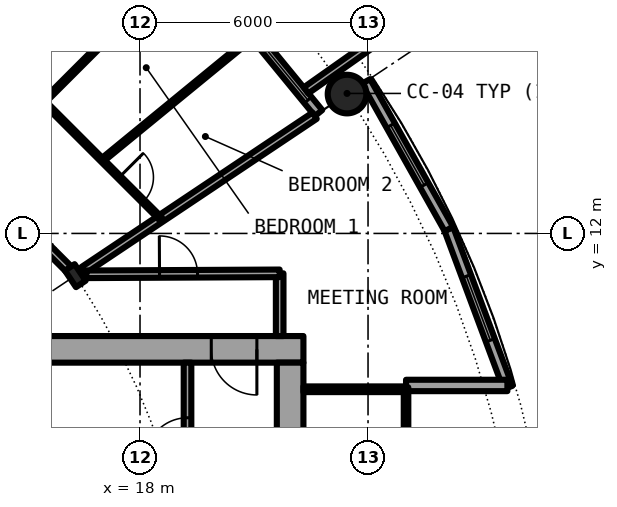
"""IFC4 building model, lengths in metres.
Left out: names, types, materials, properties, quantities, classifications, styles, units other than length and angle.
Written with IfcOpenShell. Run it as: python <this file> out.ifc"""

import sys

from ifc_helpers import new_model, si_unit, direction, frame, frame_2d, origin, origin_2d, place, context, subcontext, project, spatial, rectangle, hollow_circle, i_section, extrude, element, fill, save


model = new_model("IFC4")
c1 = context("Model", 3, precision=1e-05, world=origin(), true_north=direction((0.0, 1.0)))
c2 = subcontext(c1, "Body", "Model", "MODEL_VIEW")
j1 = project(units=[si_unit("LENGTHUNIT", "METRE"), si_unit("PLANEANGLEUNIT", "RADIAN")], contexts=[c1])
p1 = place(None, origin())
s1 = spatial("IfcSite", under=j1, at=p1, CompositionType="ELEMENT")
p2 = place(p1, origin())
s2 = spatial("IfcBuilding", under=s1, at=p2, CompositionType="ELEMENT")
p3 = place(p2, frame((0.0, 0.0, 75.8)))
s3 = spatial("IfcBuildingStorey", under=s2, at=p3, CompositionType="ELEMENT", Elevation=75.8)
p4 = place(p3, frame((23.448, 15.667, 0.0), z_axis=(0.0, 0.0, 1.0), x_axis=(1.0, 0.0, 0.0)))
e1 = element("IfcColumn", 1, at=p4, inside=s3, PredefinedType="COLUMN", context=c2, shape_type="SweptSolid", body=[
    extrude(hollow_circle(Radius=0.508, WallThickness=0.04, at=origin_2d()), origin(), (0.0, 0.0, 1.0), 3.05),
])
p5 = place(p3, frame((16.297, 10.889, 0.0), z_axis=(0.0, 0.0, 1.0), x_axis=(0.831469612303, 0.55557023302, 0.0)))
e2 = element("IfcColumn", 2, at=p5, inside=s3, PredefinedType="COLUMN", context=c2, shape_type="SweptSolid", body=[
    extrude(i_section(OverallWidth=0.306, OverallDepth=0.524, WebThickness=0.021, FlangeThickness=0.04, FilletRadius=0.027, at=origin_2d()), origin(), (0.0, 0.0, 1.0), 3.05),
])
p6 = place(p3, frame((22.699, 15.167, 0.0), z_axis=(0.0, 0.0, 1.0), x_axis=(-0.634382322723, 0.773019449054, 0.0)))
e3 = element("IfcWall", 3, at=p6, inside=s3, PredefinedType="SOLIDWALL", context=c2, shape_type="SweptSolid", body=[
    extrude(rectangle(XDim=5.352, YDim=0.25, at=frame_2d((2.676, 0.0))), origin(), (0.0, 0.0, 1.0), 2.7),
])
p7 = place(p6, frame((0.441, 0.0, 0.3)))
e4 = element("IfcOpeningElement", 4, at=p7, cuts=e3, PredefinedType="OPENING", context=c2, shape_type="SweptSolid", body=[
    extrude(rectangle(XDim=1.8, YDim=2.1, at=frame_2d((0.9, 1.05))), frame((0.0, 0.135, 0.0), z_axis=(0.0, -1.0, 0.0), x_axis=(1.0, 0.0, 0.0)), (0.0, 0.0, 1.0), 0.27),
])
p8 = place(p6, frame((3.51, 0.0, 0.0)))
e5 = element("IfcOpeningElement", 5, at=p8, cuts=e3, PredefinedType="OPENING", context=c2, shape_type="SweptSolid", body=[
    extrude(rectangle(XDim=1.0, YDim=2.2, at=frame_2d((0.5, 1.1))), frame((0.0, 0.135, 0.0), z_axis=(0.0, -1.0, 0.0), x_axis=(1.0, 0.0, 0.0)), (0.0, 0.0, 1.0), 0.27),
])
p9 = place(p3, frame((22.37, 15.765, -0.03), z_axis=(0.0, 0.0, 1.0), x_axis=(0.817256123454, 0.576274612209, 0.0)))
e6 = element("IfcWall", 6, at=p9, inside=s3, PredefinedType="SOLIDWALL", context=c2, shape_type="SweptSolid", body=[
    extrude(rectangle(XDim=2.933, YDim=0.2, at=frame_2d((1.466, 0.0))), origin(), (0.0, 0.0, 1.0), 2.73),
])
p10 = place(p3, frame((27.682, 7.945, 0.0), z_axis=(0.0, 0.0, 1.0), x_axis=(-0.349247811493, 0.937030397675, 0.0)))
e7 = element("IfcWall", 7, at=p10, inside=s3, PredefinedType="SOLIDWALL", context=c2, shape_type="SweptSolid", body=[
    extrude(rectangle(XDim=4.452, YDim=0.25, at=frame_2d((2.226, 0.0))), origin(), (0.0, 0.0, 1.0), 2.7),
])
p11 = place(p10, frame((1.327, 0.0, 0.3)))
e8 = element("IfcOpeningElement", 8, at=p11, cuts=e7, PredefinedType="OPENING", context=c2, shape_type="SweptSolid", body=[
    extrude(rectangle(XDim=1.8, YDim=2.1, at=frame_2d((0.9, 1.05))), frame((0.0, 0.135, 0.0), z_axis=(0.0, -1.0, 0.0), x_axis=(1.0, 0.0, 0.0)), (0.0, 0.0, 1.0), 0.27),
])
p12 = place(p3, frame((26.127, 12.117, 0.0), z_axis=(0.0, 0.0, 1.0), x_axis=(-0.489696356642, 0.871893042919, 0.0)))
e9 = element("IfcWall", 9, at=p12, inside=s3, PredefinedType="SOLIDWALL", context=c2, shape_type="SweptSolid", body=[
    extrude(rectangle(XDim=4.454, YDim=0.25, at=frame_2d((2.227, 0.0))), origin(), (0.0, 0.0, 1.0), 2.7),
])
p13 = place(p12, frame((1.327, 0.0, 0.3)))
e10 = element("IfcOpeningElement", 10, at=p13, cuts=e9, PredefinedType="OPENING", context=c2, shape_type="SweptSolid", body=[
    extrude(rectangle(XDim=1.8, YDim=2.1, at=frame_2d((0.9, 1.05))), frame((0.0, 0.135, 0.0), z_axis=(0.0, -1.0, 0.0), x_axis=(1.0, 0.0, 0.0)), (0.0, 0.0, 1.0), 0.27),
])
p14 = place(p3, frame((25.0, 8.0, 0.0), z_axis=(0.0, 0.0, 1.0), x_axis=(1.0, 0.0, 0.0)))
e11 = element("IfcWall", 11, at=p14, inside=s3, PredefinedType="SOLIDWALL", context=c2, shape_type="SweptSolid", body=[
    extrude(rectangle(XDim=2.667, YDim=0.3, at=frame_2d((1.333, 0.0))), origin(), (0.0, 0.0, 1.0), 2.7),
])
p15 = place(p3, frame((22.3, 8.95, 0.0), z_axis=(0.0, 0.0, 1.0), x_axis=(-1.0, 0.0, 0.0)))
e12 = element("IfcWall", 12, at=p15, inside=s3, PredefinedType="SHEAR", context=c2, shape_type="SweptSolid", body=[
    extrude(rectangle(XDim=14.0, YDim=0.7, at=frame_2d((7.0, 0.0))), origin(), (0.0, 0.0, 1.0), 3.05),
])
p16 = place(p15, frame((1.225, 0.0, 0.0)))
e13 = element("IfcOpeningElement", 13, at=p16, cuts=e12, PredefinedType="OPENING", context=c2, shape_type="SweptSolid", body=[
    extrude(rectangle(XDim=1.2, YDim=2.3, at=frame_2d((0.6, 1.15))), frame((0.0, 0.36, 0.0), z_axis=(0.0, -1.0, 0.0), x_axis=(1.0, 0.0, 0.0)), (0.0, 0.0, 1.0), 0.72),
])
p17 = place(p3, frame((21.95, 8.6, 0.0), z_axis=(0.0, 0.0, 1.0), x_axis=(0.0, -1.0, 0.0)))
e14 = element("IfcWall", 14, at=p17, inside=s3, PredefinedType="SHEAR", context=c2, shape_type="SweptSolid", body=[
    extrude(rectangle(XDim=17.2, YDim=0.7, at=frame_2d((8.6, 0.0))), origin(), (0.0, 0.0, 1.0), 3.05),
])
p18 = place(p17, frame((7.7, 0.0, 0.0)))
e15 = element("IfcOpeningElement", 15, at=p18, cuts=e14, PredefinedType="OPENING", context=c2, shape_type="SweptSolid", body=[
    extrude(rectangle(XDim=1.8, YDim=2.3, at=frame_2d((0.9, 1.15))), frame((0.0, 0.36, 0.0), z_axis=(0.0, -1.0, 0.0), x_axis=(1.0, 0.0, 0.0)), (0.0, 0.0, 1.0), 0.72),
])
p19 = place(p3, frame((19.25, 1.575, 0.0), z_axis=(0.0, 0.0, 1.0), x_axis=(0.0, 1.0, 0.0)))
e16 = element("IfcWall", 16, at=p19, inside=s3, PredefinedType="SOLIDWALL", context=c2, shape_type="SweptSolid", body=[
    extrude(rectangle(XDim=7.025, YDim=0.2, at=frame_2d((3.513, 0.0))), origin(), (0.0, 0.0, 1.0), 2.7),
])
p20 = place(p19, frame((4.475, 0.0, 0.0)))
e17 = element("IfcOpeningElement", 17, at=p20, cuts=e16, PredefinedType="OPENING", context=c2, shape_type="SweptSolid", body=[
    extrude(rectangle(XDim=1.1, YDim=2.3, at=frame_2d((0.55, 1.15))), frame((0.0, 0.11, 0.0), z_axis=(0.0, -1.0, 0.0), x_axis=(1.0, 0.0, 0.0)), (0.0, 0.0, 1.0), 0.22),
])
p21 = place(p3, frame((22.3, 7.9, 0.0), z_axis=(0.0, 0.0, 1.0), x_axis=(1.0, 0.0, 0.0)))
e18 = element("IfcWall", 18, at=p21, inside=s3, PredefinedType="PARTITIONING", context=c2, shape_type="SweptSolid", body=[
    extrude(rectangle(XDim=2.64, YDim=0.15, at=frame_2d((1.32, 0.0))), origin(), (0.0, 0.0, 1.0), 2.7),
])
p22 = place(p3, frame((25.0, -7.95, 0.0), z_axis=(0.0, 0.0, 1.0), x_axis=(0.0, 1.0, 0.0)))
e19 = element("IfcWall", 19, at=p22, inside=s3, PredefinedType="PARTITIONING", context=c2, shape_type="SweptSolid", body=[
    extrude(rectangle(XDim=15.9, YDim=0.12, at=frame_2d((7.95, 0.0))), origin(), (0.0, 0.0, 1.0), 2.7),
])
p23 = place(p22, frame((0.95, 0.0, 0.1)))
e20 = element("IfcOpeningElement", 20, at=p23, cuts=e19, PredefinedType="OPENING", context=c2, shape_type="SweptSolid", body=[
    extrude(rectangle(XDim=14.0, YDim=2.35, at=frame_2d((7.0, 1.175))), frame((0.0, 0.07, 0.0), z_axis=(0.0, -1.0, 0.0), x_axis=(1.0, 0.0, 0.0)), (0.0, 0.0, 1.0), 0.14),
])
p24 = place(p3, frame((21.675, 9.3, 0.0), z_axis=(0.0, 0.0, 1.0), x_axis=(0.0, 1.0, 0.0)))
e21 = element("IfcWall", 21, at=p24, inside=s3, PredefinedType="PARTITIONING", context=c2, shape_type="SweptSolid", body=[
    extrude(rectangle(XDim=1.65, YDim=0.2, at=frame_2d((0.825, 0.0))), origin(), (0.0, 0.0, 1.0), 2.7),
])
p25 = place(p3, frame((15.465, 15.465, 0.0), z_axis=(0.0, 0.0, 1.0), x_axis=(0.707106781187, 0.707106781187, 0.0)))
e22 = element("IfcWall", 22, at=p25, inside=s3, PredefinedType="PARTITIONING", context=c2, shape_type="SweptSolid", body=[
    extrude(rectangle(XDim=5.305, YDim=0.1, at=frame_2d((2.652, 0.0))), origin(), (0.0, 0.0, 1.0), 2.7),
])
p26 = place(p25, frame((2.202, 0.0, 0.0)))
e23 = element("IfcOpeningElement", 23, at=p26, cuts=e22, PredefinedType="OPENING", context=c2, shape_type="SweptSolid", body=[
    extrude(rectangle(XDim=0.9, YDim=2.3, at=frame_2d((0.45, 1.15))), frame((0.0, 0.06, 0.0), z_axis=(0.0, -1.0, 0.0), x_axis=(1.0, 0.0, 0.0)), (0.0, 0.0, 1.0), 0.12),
])
p27 = place(p3, frame((16.515, 11.034, 0.0), z_axis=(0.0, 0.0, 1.0), x_axis=(0.831382022135, 0.555701298605, 0.0)))
e24 = element("IfcWall", 24, at=p27, inside=s3, PredefinedType="PARTITIONING", context=c2, shape_type="SweptSolid", body=[
    extrude(rectangle(XDim=7.313, YDim=0.2, at=frame_2d((3.657, 0.0))), origin(), (0.0, 0.0, 1.0), 2.7),
])
p28 = place(p3, frame((17.004, 13.927, 0.0), z_axis=(0.0, 0.0, 1.0), x_axis=(0.773517471898, 0.633774976367, 0.0)))
e25 = element("IfcWall", 25, at=p28, inside=s3, PredefinedType="PARTITIONING", context=c2, shape_type="SweptSolid", body=[
    extrude(rectangle(XDim=5.196, YDim=0.1, at=frame_2d((2.598, 0.0))), origin(), (0.0, 0.0, 1.0), 2.7),
])
p29 = place(p3, frame((16.588, 10.925, 0.0), z_axis=(0.0, 0.0, 1.0), x_axis=(0.999988019025, 0.004895079807, 0.0)))
e26 = element("IfcWall", 26, at=p29, inside=s3, PredefinedType="PARTITIONING", context=c2, shape_type="SweptSolid", body=[
    extrude(rectangle(XDim=5.087, YDim=0.2, at=frame_2d((2.543, 0.0))), origin(), (0.0, 0.0, 1.0), 2.7),
])
p30 = place(p29, frame((1.925, 0.0, 0.0)))
e27 = element("IfcOpeningElement", 27, at=p30, cuts=e26, PredefinedType="OPENING", context=c2, shape_type="SweptSolid", body=[
    extrude(rectangle(XDim=1.0, YDim=2.3, at=frame_2d((0.5, 1.15))), frame((0.0, 0.11, 0.0), z_axis=(0.0, -1.0, 0.0), x_axis=(1.0, 0.0, 0.0)), (0.0, 0.0, 1.0), 0.22),
])
p31 = place(p3, frame((11.0, 16.186, 0.0), z_axis=(0.0, 0.0, 1.0), x_axis=(0.707106781187, -0.707106781187, 0.0)))
e28 = element("IfcWall", 28, at=p31, inside=s3, PredefinedType="PARTITIONING", context=c2, shape_type="SweptSolid", body=[
    extrude(rectangle(XDim=7.334, YDim=0.2, at=frame_2d((3.667, 0.0))), origin(), (0.0, 0.0, 1.0), 2.38),
])
p32 = place(p31, frame((4.123, 0.0, 0.0)))
e29 = element("IfcOpeningElement", 29, at=p32, cuts=e28, PredefinedType="OPENING", context=c2, shape_type="SweptSolid", body=[
    extrude(rectangle(XDim=1.0, YDim=2.3, at=frame_2d((0.5, 1.15))), frame((0.0, 0.11, 0.0), z_axis=(0.0, -1.0, 0.0), x_axis=(1.0, 0.0, 0.0)), (0.0, 0.0, 1.0), 0.22),
])
p33 = place(p3, frame((15.465, 15.465, 0.0), z_axis=(0.0, 0.0, 1.0), x_axis=(0.707190945535, -0.707022606819, 0.0)))
e30 = element("IfcWall", 30, at=p33, inside=s3, PredefinedType="PARTITIONING", context=c2, shape_type="SweptSolid", body=[
    extrude(rectangle(XDim=4.351, YDim=0.1, at=frame_2d((2.175, 0.0))), origin(), (0.0, 0.0, 1.0), 2.7),
])
p34 = place(p33, frame((2.812, 0.0, 0.0)))
e31 = element("IfcOpeningElement", 31, at=p34, cuts=e30, PredefinedType="OPENING", context=c2, shape_type="SweptSolid", body=[
    extrude(rectangle(XDim=0.9, YDim=2.3, at=frame_2d((0.45, 1.15))), frame((0.0, 0.06, 0.0), z_axis=(0.0, -1.0, 0.0), x_axis=(1.0, 0.0, 0.0)), (0.0, 0.0, 1.0), 0.12),
])
p35 = place(p7, origin())
e32 = element("IfcWindow", 32, at=p35, inside=s3, PartitioningType="SINGLE_PANEL", PredefinedType="WINDOW", context=c2, shape_type="SweptSolid", body=[
    extrude(rectangle(XDim=1.8, YDim=2.1, at=frame_2d((0.9, 1.05))), frame((0.0, 0.03, 0.0), z_axis=(0.0, -1.0, 0.0), x_axis=(1.0, 0.0, 0.0)), (0.0, 0.0, 1.0), 0.06),
])
fill(e4, e32)
p36 = place(p11, origin())
e33 = element("IfcWindow", 33, at=p36, inside=s3, PartitioningType="SINGLE_PANEL", PredefinedType="WINDOW", context=c2, shape_type="SweptSolid", body=[
    extrude(rectangle(XDim=1.8, YDim=2.1, at=frame_2d((0.9, 1.05))), frame((0.0, 0.03, 0.0), z_axis=(0.0, -1.0, 0.0), x_axis=(1.0, 0.0, 0.0)), (0.0, 0.0, 1.0), 0.06),
])
fill(e8, e33)
p37 = place(p13, origin())
e34 = element("IfcWindow", 34, at=p37, inside=s3, PartitioningType="SINGLE_PANEL", PredefinedType="WINDOW", context=c2, shape_type="SweptSolid", body=[
    extrude(rectangle(XDim=1.8, YDim=2.1, at=frame_2d((0.9, 1.05))), frame((0.0, 0.03, 0.0), z_axis=(0.0, -1.0, 0.0), x_axis=(1.0, 0.0, 0.0)), (0.0, 0.0, 1.0), 0.06),
])
fill(e10, e34)
p38 = place(p20, origin())
e35 = element("IfcDoor", 35, at=p38, inside=s3, OperationType="SINGLE_SWING_LEFT", PredefinedType="DOOR", context=c2, shape_type="SweptSolid", body=[
    extrude(rectangle(XDim=1.1, YDim=2.3, at=frame_2d((0.55, 1.15))), frame((0.0, 0.025, 0.0), z_axis=(0.0, -1.0, 0.0), x_axis=(1.0, 0.0, 0.0)), (0.0, 0.0, 1.0), 0.05),
])
fill(e17, e35)
p39 = place(p16, origin())
e36 = element("IfcDoor", 36, at=p39, inside=s3, OperationType="SINGLE_SWING_RIGHT", PredefinedType="DOOR", context=c2, shape_type="SweptSolid", body=[
    extrude(rectangle(XDim=1.2, YDim=2.3, at=frame_2d((0.6, 1.15))), frame((0.0, 0.025, 0.0), z_axis=(0.0, -1.0, 0.0), x_axis=(1.0, 0.0, 0.0)), (0.0, 0.0, 1.0), 0.05),
])
fill(e13, e36)
p40 = place(p23, origin())
e37 = element("IfcWindow", 37, at=p40, inside=s3, PartitioningType="SINGLE_PANEL", PredefinedType="WINDOW", context=c2, shape_type="SweptSolid", body=[
    extrude(rectangle(XDim=14.0, YDim=2.35, at=frame_2d((7.0, 1.175))), frame((0.0, 0.03, 0.0), z_axis=(0.0, -1.0, 0.0), x_axis=(1.0, 0.0, 0.0)), (0.0, 0.0, 1.0), 0.06),
])
fill(e20, e37)
p41 = place(p34, origin())
e38 = element("IfcDoor", 38, at=p41, inside=s3, OperationType="SINGLE_SWING_RIGHT", PredefinedType="DOOR", context=c2, shape_type="SweptSolid", body=[
    extrude(rectangle(XDim=0.9, YDim=2.3, at=frame_2d((0.45, 1.15))), frame((0.0, 0.025, 0.0), z_axis=(0.0, -1.0, 0.0), x_axis=(1.0, 0.0, 0.0)), (0.0, 0.0, 1.0), 0.05),
])
fill(e31, e38)
p42 = place(p30, origin())
e39 = element("IfcDoor", 39, at=p42, inside=s3, OperationType="SINGLE_SWING_LEFT", PredefinedType="DOOR", context=c2, shape_type="SweptSolid", body=[
    extrude(rectangle(XDim=1.0, YDim=2.3, at=frame_2d((0.5, 1.15))), frame((0.0, 0.025, 0.0), z_axis=(0.0, -1.0, 0.0), x_axis=(1.0, 0.0, 0.0)), (0.0, 0.0, 1.0), 0.05),
])
fill(e27, e39)
save(model, sys.argv[1])
